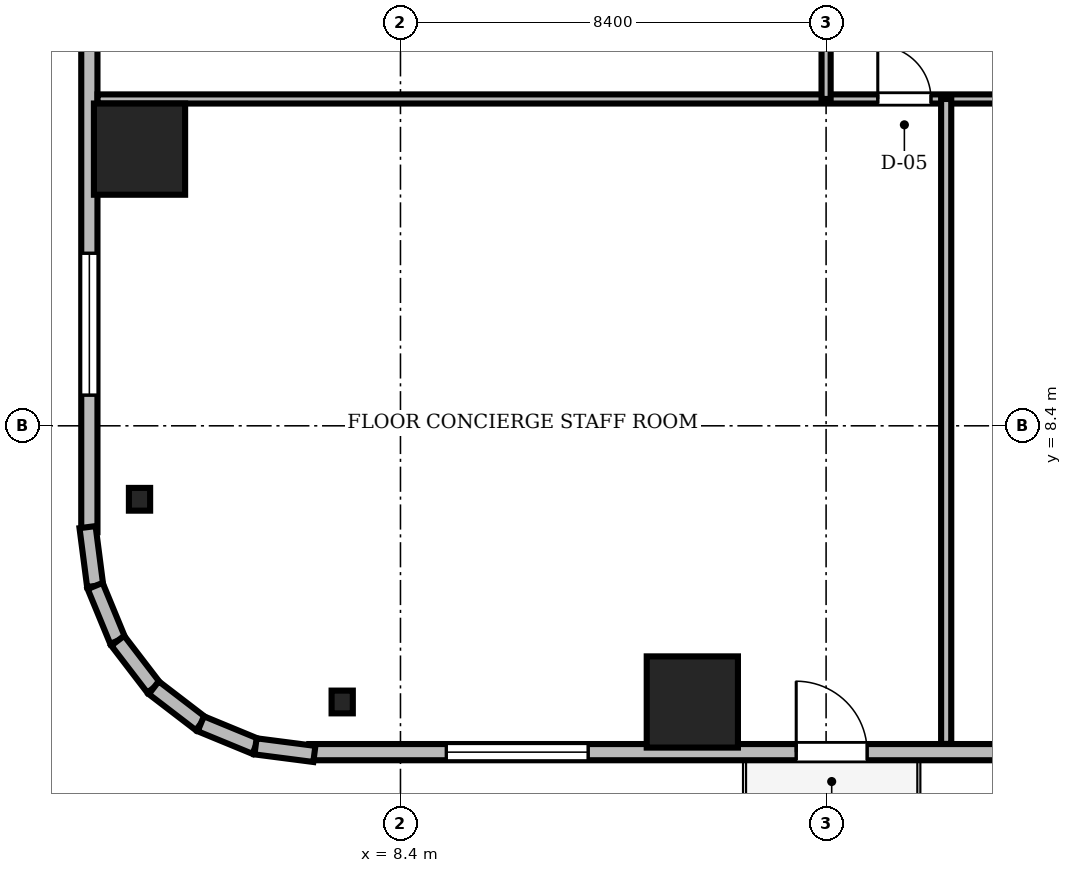
"""IFC4 building model, lengths in metres.
Left out: names, types, materials, properties, quantities, classifications, styles, units other than length and angle.
Written with IfcOpenShell. Run it as: python <this file> out.ifc"""

import sys

from ifc_helpers import new_model, si_unit, direction, frame, frame_2d, origin, origin_2d, place, context, subcontext, project, spatial, rectangle, i_section, extrude, source, transform, mapped, element, fill, save


model = new_model("IFC4")
c1 = context("Model", 3, precision=1e-05, world=origin(), true_north=direction((0.0, 1.0)))
c2 = subcontext(c1, "Body", "Model", "MODEL_VIEW")
j1 = project(units=[si_unit("LENGTHUNIT", "METRE"), si_unit("PLANEANGLEUNIT", "RADIAN")], contexts=[c1])
p1 = place(None, origin())
s1 = spatial("IfcSite", under=j1, at=p1, CompositionType="ELEMENT")
p2 = place(p1, origin())
s2 = spatial("IfcBuilding", under=s1, at=p2, CompositionType="ELEMENT")
p3 = place(p2, frame((0.0, 0.0, 56.8)))
s3 = spatial("IfcBuildingStorey", under=s2, at=p3, CompositionType="ELEMENT", Elevation=56.8)
m1 = source(origin(), c2, "Body", "SweptSolid", [
    extrude(rectangle(XDim=1.8, YDim=1.8, at=origin_2d()), origin(), (0.0, 0.0, 1.0), 3.41),
])
for number, where, z_axis, x_axis in (
    (1, (14.16, 2.95, 0.0), (0.0, 0.0, 1.0), (1.0, 0.0, 0.0)),
    (2, (3.25, 13.86, 0.0), (0.0, 0.0, 1.0), (1.0, 0.0, 0.0)),
):
    element("IfcColumn", number, at=place(p3, frame(where, z_axis=z_axis, x_axis=x_axis)), inside=s3, PredefinedType="COLUMN", context=c2, shape_type="MappedRepresentation", body=[
        mapped(m1, transform((0.0, 0.0, 0.0), scale=1.0)),
    ])
m2 = source(origin(), c2, "Body", "SweptSolid", [
    extrude(i_section(OverallWidth=0.419, OverallDepth=0.449, WebThickness=0.031, FlangeThickness=0.048, FilletRadius=0.015, at=origin_2d()), origin(), (0.0, 0.0, 1.0), 3.41),
])
for number, where, z_axis, x_axis in (
    (3, (7.25, 2.95, 0.0), (0.0, 0.0, 1.0), (1.0, 0.0, 0.0)),
    (4, (3.25, 6.95, 0.0), (0.0, 0.0, 1.0), (1.0, 0.0, 0.0)),
):
    element("IfcColumn", number, at=place(p3, frame(where, z_axis=z_axis, x_axis=x_axis)), inside=s3, PredefinedType="COLUMN", context=c2, shape_type="MappedRepresentation", body=[
        mapped(m2, transform((0.0, 0.0, 0.0), scale=1.0)),
    ])
m3 = source(origin(), c2, "Body", "SweptSolid", [
    extrude(rectangle(XDim=15.6, YDim=0.32, at=frame_2d((7.8, 0.0))), origin(), (0.0, 0.0, 1.0), 3.41),
])
p4 = place(p3, frame((6.6, 1.96, 0.0), z_axis=(0.0, 0.0, 1.0), x_axis=(1.0, 0.0, 0.0)))
e5 = element("IfcWall", 5, at=p4, inside=s3, PredefinedType="SOLIDWALL", context=c2, shape_type="MappedRepresentation", body=[
    mapped(m3, transform((0.0, 0.0, 0.0), scale=1.0)),
])
m4 = source(origin(), c2, "Body", "SweptSolid", [
    extrude(rectangle(XDim=1.4, YDim=2.3, at=frame_2d((0.7, 1.15))), frame((0.0, 0.17, 0.0), z_axis=(0.0, -1.0, 0.0), x_axis=(1.0, 0.0, 0.0)), (0.0, 0.0, 1.0), 0.34),
])
p5 = place(p4, frame((9.61, 0.0, 0.0)))
e6 = element("IfcOpeningElement", 6, at=p5, cuts=e5, PredefinedType="OPENING", context=c2, shape_type="MappedRepresentation", body=[
    mapped(m4, transform((0.0, 0.0, 0.0), scale=1.0)),
])
m5 = source(origin(), c2, "Body", "SweptSolid", [
    extrude(rectangle(XDim=2.8, YDim=2.4, at=frame_2d((1.4, 1.2))), frame((0.0, 0.17, 0.0), z_axis=(0.0, -1.0, 0.0), x_axis=(1.0, 0.0, 0.0)), (0.0, 0.0, 1.0), 0.34),
])
p6 = place(p4, frame((2.705, 0.0, 0.72)))
e7 = element("IfcOpeningElement", 7, at=p6, cuts=e5, PredefinedType="OPENING", context=c2, shape_type="MappedRepresentation", body=[
    mapped(m5, transform((0.0, 0.0, 0.0), scale=1.0)),
])
p7 = place(p3, frame((2.26, 21.9, 0.0), z_axis=(0.0, 0.0, 1.0), x_axis=(0.0, -1.0, 0.0)))
e8 = element("IfcWall", 8, at=p7, inside=s3, PredefinedType="SOLIDWALL", context=c2, shape_type="MappedRepresentation", body=[
    mapped(m3, transform((0.0, 0.0, 0.0), scale=1.0)),
])
p8 = place(p7, frame((10.095, 0.0, 0.72)))
e9 = element("IfcOpeningElement", 9, at=p8, cuts=e8, PredefinedType="OPENING", context=c2, shape_type="MappedRepresentation", body=[
    mapped(m5, transform((0.0, 0.0, 0.0), scale=1.0)),
])
m6 = source(origin(), c2, "Body", "SweptSolid", [
    extrude(rectangle(XDim=1.171, YDim=0.32, at=frame_2d((0.585, 0.0))), origin(), (0.0, 0.0, 1.0), 3.41),
])
p9 = place(p3, frame((2.224, 6.401, 0.0), z_axis=(0.0, 0.0, 1.0), x_axis=(0.128269133229, -0.991739395941, 0.0)))
e10 = element("IfcWall", 10, at=p9, inside=s3, PredefinedType="SOLIDWALL", context=c2, shape_type="MappedRepresentation", body=[
    mapped(m6, transform((0.0, 0.0, 0.0), scale=1.0)),
])
m7 = source(origin(), c2, "Body", "SweptSolid", [
    extrude(rectangle(XDim=1.169, YDim=0.32, at=frame_2d((0.584, 0.0))), origin(), (0.0, 0.0, 1.0), 3.41),
])
for number, where, z_axis, x_axis in (
    (11, (2.375, 5.24, 0.0), (0.0, 0.0, 1.0), (0.381, -0.925, 0.0)),
    (12, (2.82, 4.159, 0.0), (0.0, 0.0, 1.0), (0.608, -0.794, 0.0)),
):
    element("IfcWall", number, at=place(p3, frame(where, z_axis=z_axis, x_axis=x_axis)), inside=s3, PredefinedType="SOLIDWALL", context=c2, shape_type="MappedRepresentation", body=[
        mapped(m7, transform((0.0, 0.0, 0.0), scale=1.0)),
    ])
m8 = source(origin(), c2, "Body", "SweptSolid", [
    extrude(rectangle(XDim=1.169, YDim=0.32, at=frame_2d((0.584, 0.0))), origin(), (0.0, 0.0, 1.0), 3.41),
])
p10 = place(p3, frame((3.531, 3.231, 0.0), z_axis=(0.0, 0.0, 1.0), x_axis=(0.793663520347, -0.608356981114, 0.0)))
e13 = element("IfcWall", 13, at=p10, inside=s3, PredefinedType="SOLIDWALL", context=c2, shape_type="MappedRepresentation", body=[
    mapped(m8, transform((0.0, 0.0, 0.0), scale=1.0)),
])
m9 = source(origin(), c2, "Body", "SweptSolid", [
    extrude(rectangle(XDim=1.169, YDim=0.32, at=frame_2d((0.585, 0.0))), origin(), (0.0, 0.0, 1.0), 3.41),
])
p11 = place(p3, frame((4.459, 2.52, 0.0), z_axis=(0.0, 0.0, 1.0), x_axis=(0.924479075121, -0.381232789334, 0.0)))
e14 = element("IfcWall", 14, at=p11, inside=s3, PredefinedType="SOLIDWALL", context=c2, shape_type="MappedRepresentation", body=[
    mapped(m9, transform((0.0, 0.0, 0.0), scale=1.0)),
])
m10 = source(origin(), c2, "Body", "SweptSolid", [
    extrude(rectangle(XDim=1.17, YDim=0.32, at=frame_2d((0.585, 0.0))), origin(), (0.0, 0.0, 1.0), 3.41),
])
p12 = place(p3, frame((5.54, 2.074, 0.0), z_axis=(0.0, 0.0, 1.0), x_axis=(0.991762485493, -0.128090485085, 0.0)))
e15 = element("IfcWall", 15, at=p12, inside=s3, PredefinedType="SOLIDWALL", context=c2, shape_type="MappedRepresentation", body=[
    mapped(m10, transform((0.0, 0.0, 0.0), scale=1.0)),
])
m11 = source(origin(), c2, "Body", "SweptSolid", [
    extrude(rectangle(XDim=46.156, YDim=0.18, at=frame_2d((23.078, 0.0))), origin(), (0.0, 0.0, 1.0), 2.652),
])
p13 = place(p3, frame((2.422, 14.85, 0.0), z_axis=(0.0, 0.0, 1.0), x_axis=(1.0, 0.0, 0.0)))
e16 = element("IfcWall", 16, at=p13, inside=s3, PredefinedType="PARTITIONING", context=c2, shape_type="MappedRepresentation", body=[
    mapped(m11, transform((0.0, 0.0, 0.0), scale=1.0)),
])
m12 = source(origin(), c2, "Body", "SweptSolid", [
    extrude(rectangle(XDim=1.05, YDim=2.2, at=frame_2d((0.525, 1.1))), frame((0.0, 0.1, 0.0), z_axis=(0.0, -1.0, 0.0), x_axis=(1.0, 0.0, 0.0)), (0.0, 0.0, 1.0), 0.2),
])
p14 = place(p13, frame((15.398, 0.0, 0.0)))
e17 = element("IfcOpeningElement", 17, at=p14, cuts=e16, PredefinedType="OPENING", context=c2, shape_type="MappedRepresentation", body=[
    mapped(m12, transform((0.0, 0.0, 0.0), scale=1.0)),
])
p15 = place(p13, frame((18.196, 0.0, 0.0)))
e18 = element("IfcOpeningElement", 18, at=p15, cuts=e16, PredefinedType="OPENING", context=c2, shape_type="MappedRepresentation", body=[
    mapped(m12, transform((0.0, 0.0, 0.0), scale=1.0)),
])
p16 = place(p13, frame((22.132, 0.0, 0.0)))
e19 = element("IfcOpeningElement", 19, at=p16, cuts=e16, PredefinedType="OPENING", context=c2, shape_type="MappedRepresentation", body=[
    mapped(m12, transform((0.0, 0.0, 0.0), scale=1.0)),
])
p17 = place(p13, frame((26.069, 0.0, 0.0)))
e20 = element("IfcOpeningElement", 20, at=p17, cuts=e16, PredefinedType="OPENING", context=c2, shape_type="MappedRepresentation", body=[
    mapped(m12, transform((0.0, 0.0, 0.0), scale=1.0)),
])
p18 = place(p13, frame((30.005, 0.0, 0.0)))
e21 = element("IfcOpeningElement", 21, at=p18, cuts=e16, PredefinedType="OPENING", context=c2, shape_type="MappedRepresentation", body=[
    mapped(m12, transform((0.0, 0.0, 0.0), scale=1.0)),
])
p19 = place(p13, frame((33.941, 0.0, 0.0)))
e22 = element("IfcOpeningElement", 22, at=p19, cuts=e16, PredefinedType="OPENING", context=c2, shape_type="MappedRepresentation", body=[
    mapped(m12, transform((0.0, 0.0, 0.0), scale=1.0)),
])
p20 = place(p13, frame((37.877, 0.0, 0.0)))
e23 = element("IfcOpeningElement", 23, at=p20, cuts=e16, PredefinedType="OPENING", context=c2, shape_type="MappedRepresentation", body=[
    mapped(m12, transform((0.0, 0.0, 0.0), scale=1.0)),
])
p21 = place(p13, frame((42.727, 0.0, 0.0)))
e24 = element("IfcOpeningElement", 24, at=p21, cuts=e16, PredefinedType="OPENING", context=c2, shape_type="MappedRepresentation", body=[
    mapped(m12, transform((0.0, 0.0, 0.0), scale=1.0)),
])
m13 = source(origin(), c2, "Body", "SweptSolid", [
    extrude(rectangle(XDim=13.7, YDim=0.18, at=frame_2d((6.85, 0.0))), origin(), (0.0, 0.0, 1.0), 2.802),
])
p22 = place(p3, frame((16.8, 14.85, 0.0), z_axis=(0.0, 0.0, 1.0), x_axis=(0.0, 1.0, 0.0)))
e25 = element("IfcWall", 25, at=p22, inside=s3, PredefinedType="PARTITIONING", context=c2, shape_type="MappedRepresentation", body=[
    mapped(m13, transform((0.0, 0.0, 0.0), scale=1.0)),
])
p23 = place(p22, frame((2.867, 0.0, 0.0)))
e26 = element("IfcOpeningElement", 26, at=p23, cuts=e25, PredefinedType="OPENING", context=c2, shape_type="MappedRepresentation", body=[
    mapped(m12, transform((0.0, 0.0, 0.0), scale=1.0)),
])
m14 = source(origin(), c2, "Body", "SweptSolid", [
    extrude(rectangle(XDim=0.95, YDim=2.15, at=frame_2d((0.475, 1.075))), frame((0.0, 0.1, 0.0), z_axis=(0.0, -1.0, 0.0), x_axis=(1.0, 0.0, 0.0)), (0.0, 0.0, 1.0), 0.2),
])
p24 = place(p22, frame((10.867, 0.0, 0.0)))
e27 = element("IfcOpeningElement", 27, at=p24, cuts=e25, PredefinedType="OPENING", context=c2, shape_type="MappedRepresentation", body=[
    mapped(m14, transform((0.0, 0.0, 0.0), scale=1.0)),
])
m15 = source(origin(), c2, "Body", "SweptSolid", [
    extrude(rectangle(XDim=12.728, YDim=0.2, at=frame_2d((6.364, 0.0))), origin(), (0.0, 0.0, 1.0), 2.652),
])
p25 = place(p3, frame((19.17, 2.122, 0.0), z_axis=(0.0, 0.0, 1.0), x_axis=(0.0, 1.0, 0.0)))
e28 = element("IfcWall", 28, at=p25, inside=s3, PredefinedType="PARTITIONING", context=c2, shape_type="MappedRepresentation", body=[
    mapped(m15, transform((0.0, 0.0, 0.0), scale=1.0)),
])
m16 = source(origin(), c2, "Body", "SweptSolid", [
    extrude(rectangle(XDim=1.4, YDim=2.3, at=frame_2d((0.7, 1.15))), frame((0.0, 0.025, 0.0), z_axis=(0.0, -1.0, 0.0), x_axis=(1.0, 0.0, 0.0)), (0.0, 0.0, 1.0), 0.05),
])
p26 = place(p5, frame((1.4, 0.0, 0.0), z_axis=(0.0, 0.0, 1.0), x_axis=(-1.0, 0.0, 0.0)))
e29 = element("IfcDoor", 29, at=p26, inside=s3, OperationType="DOUBLE_DOOR_SLIDING", PredefinedType="DOOR", context=c2, shape_type="MappedRepresentation", body=[
    mapped(m16, transform((0.0, 0.0, 0.0), scale=1.0)),
])
fill(e6, e29)
m17 = source(origin(), c2, "Body", "SweptSolid", [
    extrude(rectangle(XDim=2.8, YDim=2.4, at=frame_2d((1.4, 1.2))), frame((0.0, 0.03, 0.0), z_axis=(0.0, -1.0, 0.0), x_axis=(1.0, 0.0, 0.0)), (0.0, 0.0, 1.0), 0.06),
])
p27 = place(p6, origin())
e30 = element("IfcWindow", 30, at=p27, inside=s3, PartitioningType="SINGLE_PANEL", PredefinedType="WINDOW", context=c2, shape_type="MappedRepresentation", body=[
    mapped(m17, transform((0.0, 0.0, 0.0), scale=1.0)),
])
fill(e7, e30)
p28 = place(p8, origin())
e31 = element("IfcWindow", 31, at=p28, inside=s3, PartitioningType="SINGLE_PANEL", PredefinedType="WINDOW", context=c2, shape_type="MappedRepresentation", body=[
    mapped(m17, transform((0.0, 0.0, 0.0), scale=1.0)),
])
fill(e9, e31)
m18 = source(origin(), c2, "Body", "SweptSolid", [
    extrude(rectangle(XDim=1.05, YDim=2.2, at=frame_2d((0.525, 1.1))), frame((0.0, 0.025, 0.0), z_axis=(0.0, -1.0, 0.0), x_axis=(1.0, 0.0, 0.0)), (0.0, 0.0, 1.0), 0.05),
])
p29 = place(p14, origin())
e32 = element("IfcDoor", 32, at=p29, inside=s3, OperationType="SINGLE_SWING_LEFT", PredefinedType="DOOR", context=c2, shape_type="MappedRepresentation", body=[
    mapped(m18, transform((0.0, 0.0, 0.0), scale=1.0)),
])
fill(e17, e32)
save(model, sys.argv[1])
